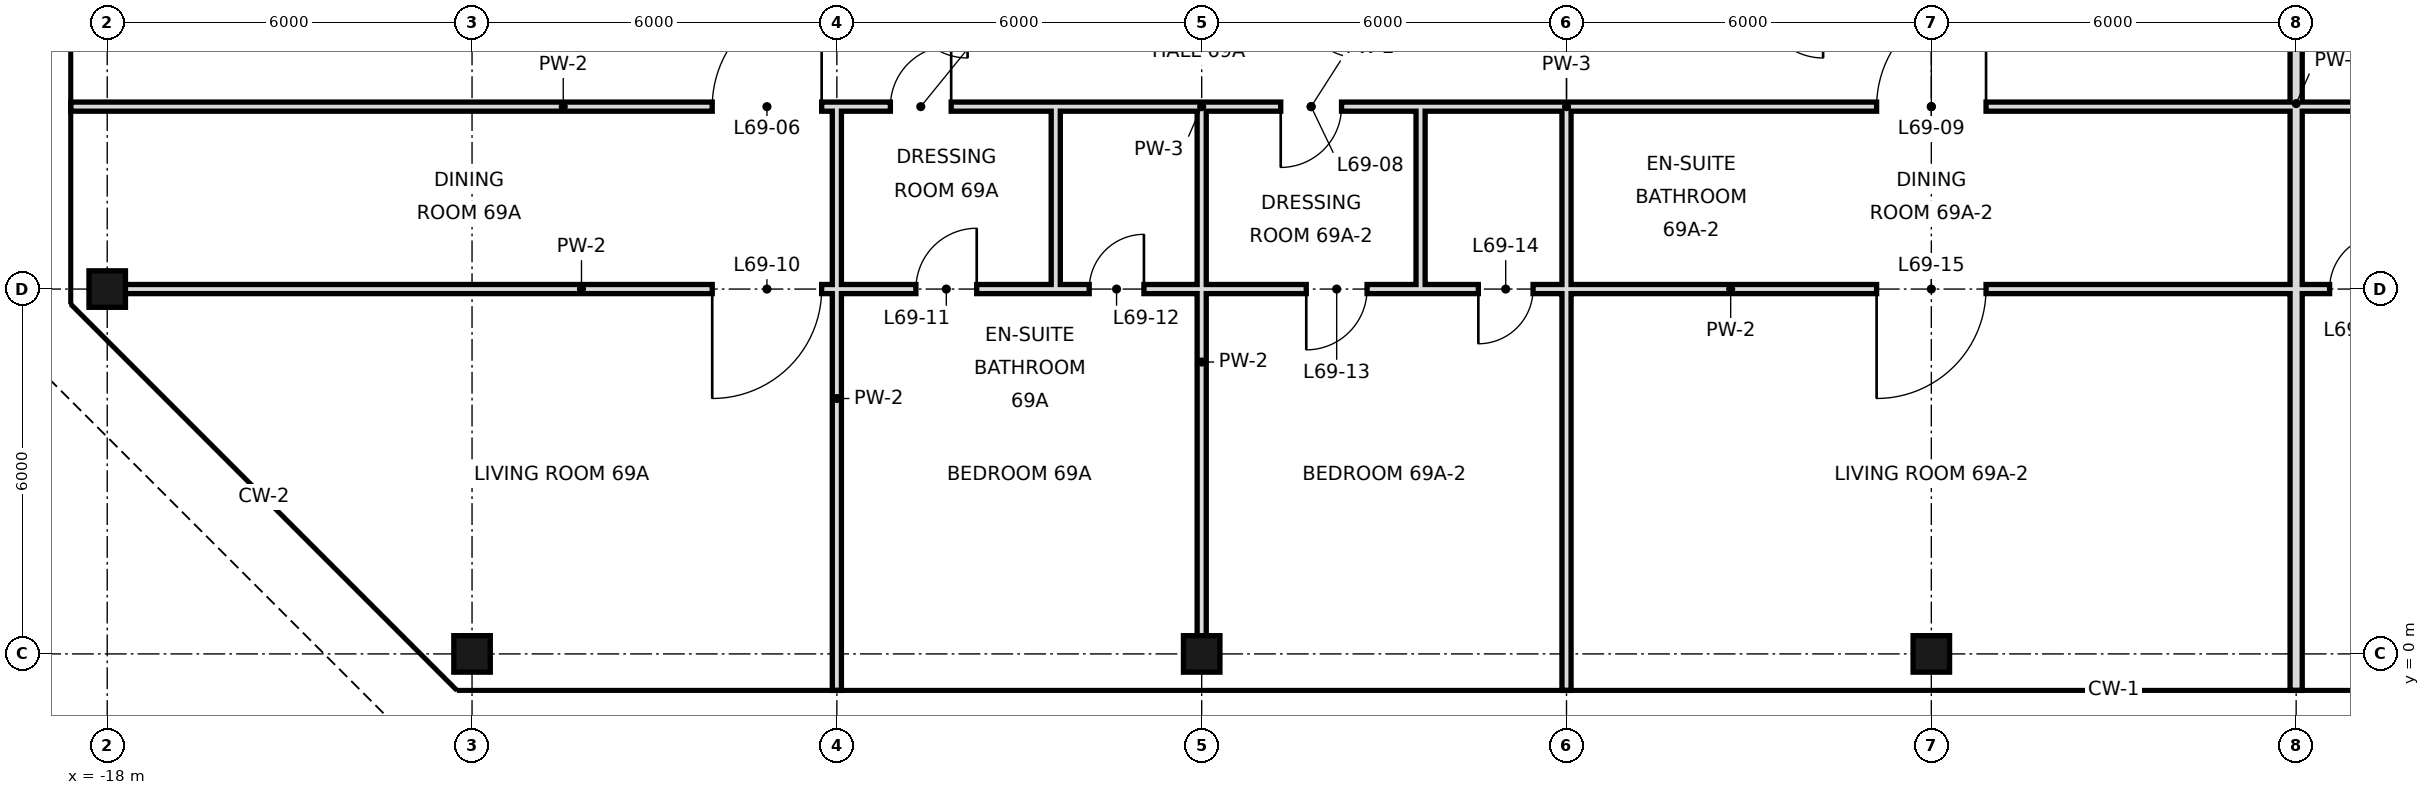
"""IFC4 building model, lengths in metres.
Left out: names, types, materials, properties, quantities, classifications, styles, units other than length and angle.
Written with IfcOpenShell. Run it as: python <this file> out.ifc"""

import sys

from ifc_helpers import new_model, si_unit, direction, frame, frame_2d, origin, origin_2d, place, context, subcontext, project, spatial, rectangle, hollow_rectangle, extrude, element, fill, save


model = new_model("IFC4")
c1 = context("Model", 3, precision=1e-05, world=origin(), true_north=direction((0.0, 1.0)))
c2 = subcontext(c1, "Body", "Model", "MODEL_VIEW")
j1 = project(units=[si_unit("LENGTHUNIT", "METRE"), si_unit("PLANEANGLEUNIT", "RADIAN")], contexts=[c1])
p1 = place(None, origin())
s1 = spatial("IfcSite", under=j1, at=p1, CompositionType="ELEMENT")
p2 = place(p1, origin())
s2 = spatial("IfcBuilding", under=s1, at=p2, CompositionType="ELEMENT")
p3 = place(p2, frame((0.0, 0.0, 294.4)))
s3 = spatial("IfcBuildingStorey", under=s2, at=p3, CompositionType="ELEMENT", Elevation=294.4)
for number, where, z_axis, x_axis in (
    (1, (-18.0, 6.0, 0.0), (0.0, 0.0, 1.0), (1.0, 0.0, 0.0)),
    (2, (-12.0, 0.0, 0.0), (0.0, 0.0, 1.0), (1.0, 0.0, 0.0)),
    (3, (0.0, 0.0, 0.0), (0.0, 0.0, 1.0), (1.0, 0.0, 0.0)),
    (4, (12.0, 0.0, 0.0), (0.0, 0.0, 1.0), (1.0, 0.0, 0.0)),
):
    element("IfcColumn", number, at=place(p3, frame(where, z_axis=z_axis, x_axis=x_axis)), inside=s3, PredefinedType="COLUMN", context=c2, shape_type="SweptSolid", body=[
        extrude(hollow_rectangle(XDim=0.6, YDim=0.6, WallThickness=0.028, at=origin_2d()), origin(), (0.0, 0.0, 1.0), 3.6),
    ])
p4 = place(p3, frame((-2.4, 6.0, 0.0), z_axis=(0.0, 0.0, 1.0), x_axis=(0.0, 1.0, 0.0)))
e5 = element("IfcWall", 5, at=p4, inside=s3, PredefinedType="PARTITIONING", context=c2, shape_type="SweptSolid", body=[
    extrude(rectangle(XDim=3.0, YDim=0.15, at=frame_2d((1.5, 0.0))), origin(), (0.0, 0.0, 1.0), 3.42),
])
p5 = place(p3, frame((-6.0, -0.6, 0.0), z_axis=(0.0, 0.0, 1.0), x_axis=(0.0, 1.0, 0.0)))
e6 = element("IfcWall", 6, at=p5, inside=s3, PredefinedType="PARTITIONING", context=c2, shape_type="SweptSolid", body=[
    extrude(rectangle(XDim=9.6, YDim=0.15, at=frame_2d((4.8, 0.0))), origin(), (0.0, 0.0, 1.0), 3.42),
])
p6 = place(p3, frame((0.0, 0.0, 0.0), z_axis=(0.0, 0.0, 1.0), x_axis=(0.0, 1.0, 0.0)))
e7 = element("IfcWall", 7, at=p6, inside=s3, PredefinedType="PARTITIONING", context=c2, shape_type="SweptSolid", body=[
    extrude(rectangle(XDim=6.0, YDim=0.15, at=frame_2d((3.0, 0.0))), origin(), (0.0, 0.0, 1.0), 2.72),
])
p7 = place(p3, frame((0.0, 6.0, 0.0), z_axis=(0.0, 0.0, 1.0), x_axis=(0.0, 1.0, 0.0)))
e8 = element("IfcWall", 8, at=p7, inside=s3, PredefinedType="PARTITIONING", context=c2, shape_type="SweptSolid", body=[
    extrude(rectangle(XDim=3.0, YDim=0.15, at=frame_2d((1.5, 0.0))), origin(), (0.0, 0.0, 1.0), 2.72),
])
p8 = place(p3, frame((18.0, -0.6, 0.0), z_axis=(0.0, 0.0, 1.0), x_axis=(0.0, 1.0, 0.0)))
e9 = element("IfcWall", 9, at=p8, inside=s3, PredefinedType="SOLIDWALL", context=c2, shape_type="SweptSolid", body=[
    extrude(rectangle(XDim=19.3, YDim=0.2, at=frame_2d((9.65, 0.0))), origin(), (0.0, 0.0, 1.0), 2.72),
])
p9 = place(p3, frame((3.6, 6.0, 0.0), z_axis=(0.0, 0.0, 1.0), x_axis=(0.0, 1.0, 0.0)))
e10 = element("IfcWall", 10, at=p9, inside=s3, PredefinedType="PARTITIONING", context=c2, shape_type="SweptSolid", body=[
    extrude(rectangle(XDim=3.0, YDim=0.15, at=frame_2d((1.5, 0.0))), origin(), (0.0, 0.0, 1.0), 3.42),
])
p10 = place(p3, frame((6.0, -0.6, 0.0), z_axis=(0.0, 0.0, 1.0), x_axis=(0.0, 1.0, 0.0)))
e11 = element("IfcWall", 11, at=p10, inside=s3, PredefinedType="PARTITIONING", context=c2, shape_type="SweptSolid", body=[
    extrude(rectangle(XDim=6.6, YDim=0.15, at=frame_2d((3.3, 0.0))), origin(), (0.0, 0.0, 1.0), 3.42),
])
p11 = place(p3, frame((6.0, 6.0, 0.0), z_axis=(0.0, 0.0, 1.0), x_axis=(0.0, 1.0, 0.0)))
e12 = element("IfcWall", 12, at=p11, inside=s3, PredefinedType="PARTITIONING", context=c2, shape_type="SweptSolid", body=[
    extrude(rectangle(XDim=3.0, YDim=0.15, at=frame_2d((1.5, 0.0))), origin(), (0.0, 0.0, 1.0), 3.42),
])
p12 = place(p3, frame((-18.0, 6.0, 0.0), z_axis=(0.0, 0.0, 1.0), x_axis=(1.0, 0.0, 0.0)))
e13 = element("IfcWall", 13, at=p12, inside=s3, PredefinedType="PARTITIONING", context=c2, shape_type="SweptSolid", body=[
    extrude(rectangle(XDim=15.6, YDim=0.15, at=frame_2d((7.8, 0.0))), origin(), (0.0, 0.0, 1.0), 2.72),
])
p13 = place(p12, frame((9.95, 0.0, 0.0)))
e14 = element("IfcOpeningElement", 14, at=p13, cuts=e13, PredefinedType="OPENING", context=c2, shape_type="SweptSolid", body=[
    extrude(rectangle(XDim=1.8, YDim=2.4, at=frame_2d((0.9, 1.2))), frame((0.0, 0.085, 0.0), z_axis=(0.0, -1.0, 0.0), x_axis=(1.0, 0.0, 0.0)), (0.0, 0.0, 1.0), 0.17),
])
p14 = place(p12, frame((13.3, 0.0, 0.0)))
e15 = element("IfcOpeningElement", 15, at=p14, cuts=e13, PredefinedType="OPENING", context=c2, shape_type="SweptSolid", body=[
    extrude(rectangle(XDim=1.0, YDim=2.4, at=frame_2d((0.5, 1.2))), frame((0.0, 0.085, 0.0), z_axis=(0.0, -1.0, 0.0), x_axis=(1.0, 0.0, 0.0)), (0.0, 0.0, 1.0), 0.17),
])
p15 = place(p3, frame((0.0, 6.0, 0.0), z_axis=(0.0, 0.0, 1.0), x_axis=(1.0, 0.0, 0.0)))
e16 = element("IfcWall", 16, at=p15, inside=s3, PredefinedType="PARTITIONING", context=c2, shape_type="SweptSolid", body=[
    extrude(rectangle(XDim=3.6, YDim=0.15, at=frame_2d((1.8, 0.0))), origin(), (0.0, 0.0, 1.0), 2.72),
])
p16 = place(p15, frame((1.72, 0.0, 0.0)))
e17 = element("IfcOpeningElement", 17, at=p16, cuts=e16, PredefinedType="OPENING", context=c2, shape_type="SweptSolid", body=[
    extrude(rectangle(XDim=1.0, YDim=2.4, at=frame_2d((0.5, 1.2))), frame((0.0, 0.085, 0.0), z_axis=(0.0, -1.0, 0.0), x_axis=(1.0, 0.0, 0.0)), (0.0, 0.0, 1.0), 0.17),
])
p17 = place(p3, frame((6.0, 6.0, 0.0), z_axis=(0.0, 0.0, 1.0), x_axis=(1.0, 0.0, 0.0)))
e18 = element("IfcWall", 18, at=p17, inside=s3, PredefinedType="PARTITIONING", context=c2, shape_type="SweptSolid", body=[
    extrude(rectangle(XDim=12.0, YDim=0.15, at=frame_2d((6.0, 0.0))), origin(), (0.0, 0.0, 1.0), 2.72),
])
p18 = place(p17, frame((5.1, 0.0, 0.0)))
e19 = element("IfcOpeningElement", 19, at=p18, cuts=e18, PredefinedType="OPENING", context=c2, shape_type="SweptSolid", body=[
    extrude(rectangle(XDim=1.8, YDim=2.4, at=frame_2d((0.9, 1.2))), frame((0.0, 0.085, 0.0), z_axis=(0.0, -1.0, 0.0), x_axis=(1.0, 0.0, 0.0)), (0.0, 0.0, 1.0), 0.17),
])
p19 = place(p3, frame((-2.4, 6.0, 0.0), z_axis=(0.0, 0.0, 1.0), x_axis=(1.0, 0.0, 0.0)))
e20 = element("IfcWall", 20, at=p19, inside=s3, PredefinedType="PARTITIONING", context=c2, shape_type="SweptSolid", body=[
    extrude(rectangle(XDim=2.4, YDim=0.15, at=frame_2d((1.2, 0.0))), origin(), (0.0, 0.0, 1.0), 2.72),
])
p20 = place(p19, frame((0.55, 0.0, 0.0)))
e21 = element("IfcOpeningElement", 21, at=p20, cuts=e20, PredefinedType="OPENING", context=c2, shape_type="SweptSolid", body=[
    extrude(rectangle(XDim=0.9, YDim=2.4, at=frame_2d((0.45, 1.2))), frame((0.0, 0.085, 0.0), z_axis=(0.0, -1.0, 0.0), x_axis=(1.0, 0.0, 0.0)), (0.0, 0.0, 1.0), 0.17),
])
p21 = place(p3, frame((3.6, 6.0, 0.0), z_axis=(0.0, 0.0, 1.0), x_axis=(1.0, 0.0, 0.0)))
e22 = element("IfcWall", 22, at=p21, inside=s3, PredefinedType="PARTITIONING", context=c2, shape_type="SweptSolid", body=[
    extrude(rectangle(XDim=2.4, YDim=0.15, at=frame_2d((1.2, 0.0))), origin(), (0.0, 0.0, 1.0), 2.72),
])
p22 = place(p21, frame((0.95, 0.0, 0.0)))
e23 = element("IfcOpeningElement", 23, at=p22, cuts=e22, PredefinedType="OPENING", context=c2, shape_type="SweptSolid", body=[
    extrude(rectangle(XDim=0.9, YDim=2.4, at=frame_2d((0.45, 1.2))), frame((0.0, 0.085, 0.0), z_axis=(0.0, -1.0, 0.0), x_axis=(1.0, 0.0, 0.0)), (0.0, 0.0, 1.0), 0.17),
])
p23 = place(p3, frame((18.0, 6.0, 0.0), z_axis=(0.0, 0.0, 1.0), x_axis=(1.0, 0.0, 0.0)))
e24 = element("IfcWall", 24, at=p23, inside=s3, PredefinedType="PARTITIONING", context=c2, shape_type="SweptSolid", body=[
    extrude(rectangle(XDim=2.4, YDim=0.15, at=frame_2d((1.2, 0.0))), origin(), (0.0, 0.0, 1.0), 2.72),
])
p24 = place(p23, frame((0.55, 0.0, 0.0)))
e25 = element("IfcOpeningElement", 25, at=p24, cuts=e24, PredefinedType="OPENING", context=c2, shape_type="SweptSolid", body=[
    extrude(rectangle(XDim=0.9, YDim=2.4, at=frame_2d((0.45, 1.2))), frame((0.0, 0.085, 0.0), z_axis=(0.0, -1.0, 0.0), x_axis=(1.0, 0.0, 0.0)), (0.0, 0.0, 1.0), 0.17),
])
p25 = place(p3, frame((-18.6, 9.0, 0.0), z_axis=(0.0, 0.0, 1.0), x_axis=(1.0, 0.0, 0.0)))
e26 = element("IfcWall", 26, at=p25, inside=s3, PredefinedType="PARTITIONING", context=c2, shape_type="SweptSolid", body=[
    extrude(rectangle(XDim=16.2, YDim=0.15, at=frame_2d((8.1, 0.0))), origin(), (0.0, 0.0, 1.0), 3.42),
])
p26 = place(p25, frame((10.55, 0.0, 0.0)))
e27 = element("IfcOpeningElement", 27, at=p26, cuts=e26, PredefinedType="OPENING", context=c2, shape_type="SweptSolid", body=[
    extrude(rectangle(XDim=1.8, YDim=2.4, at=frame_2d((0.9, 1.2))), frame((0.0, 0.085, 0.0), z_axis=(0.0, -1.0, 0.0), x_axis=(1.0, 0.0, 0.0)), (0.0, 0.0, 1.0), 0.17),
])
p27 = place(p25, frame((13.48, 0.0, 0.0)))
e28 = element("IfcOpeningElement", 28, at=p27, cuts=e26, PredefinedType="OPENING", context=c2, shape_type="SweptSolid", body=[
    extrude(rectangle(XDim=1.0, YDim=2.4, at=frame_2d((0.5, 1.2))), frame((0.0, 0.085, 0.0), z_axis=(0.0, -1.0, 0.0), x_axis=(1.0, 0.0, 0.0)), (0.0, 0.0, 1.0), 0.17),
])
p28 = place(p3, frame((0.0, 9.0, 0.0), z_axis=(0.0, 0.0, 1.0), x_axis=(1.0, 0.0, 0.0)))
e29 = element("IfcWall", 29, at=p28, inside=s3, PredefinedType="PARTITIONING", context=c2, shape_type="SweptSolid", body=[
    extrude(rectangle(XDim=3.6, YDim=0.15, at=frame_2d((1.8, 0.0))), origin(), (0.0, 0.0, 1.0), 3.42),
])
p29 = place(p28, frame((1.3, 0.0, 0.0)))
e30 = element("IfcOpeningElement", 30, at=p29, cuts=e29, PredefinedType="OPENING", context=c2, shape_type="SweptSolid", body=[
    extrude(rectangle(XDim=1.0, YDim=2.4, at=frame_2d((0.5, 1.2))), frame((0.0, 0.085, 0.0), z_axis=(0.0, -1.0, 0.0), x_axis=(1.0, 0.0, 0.0)), (0.0, 0.0, 1.0), 0.17),
])
p30 = place(p3, frame((6.0, 9.0, 0.0), z_axis=(0.0, 0.0, 1.0), x_axis=(1.0, 0.0, 0.0)))
e31 = element("IfcWall", 31, at=p30, inside=s3, PredefinedType="PARTITIONING", context=c2, shape_type="SweptSolid", body=[
    extrude(rectangle(XDim=12.0, YDim=0.15, at=frame_2d((6.0, 0.0))), origin(), (0.0, 0.0, 1.0), 3.42),
])
p31 = place(p30, frame((5.1, 0.0, 0.0)))
e32 = element("IfcOpeningElement", 32, at=p31, cuts=e31, PredefinedType="OPENING", context=c2, shape_type="SweptSolid", body=[
    extrude(rectangle(XDim=1.8, YDim=2.4, at=frame_2d((0.9, 1.2))), frame((0.0, 0.085, 0.0), z_axis=(0.0, -1.0, 0.0), x_axis=(1.0, 0.0, 0.0)), (0.0, 0.0, 1.0), 0.17),
])
for number, where, z_axis, x_axis in (
    (33, (-2.4, 9.0, 0.0), (0.0, 0.0, 1.0), (1.0, 0.0, 0.0)),
    (34, (3.6, 9.0, 0.0), (0.0, 0.0, 1.0), (1.0, 0.0, 0.0)),
    (35, (18.0, 9.0, 0.0), (0.0, 0.0, 1.0), (1.0, 0.0, 0.0)),
):
    element("IfcWall", number, at=place(p3, frame(where, z_axis=z_axis, x_axis=x_axis)), inside=s3, PredefinedType="PARTITIONING", context=c2, shape_type="SweptSolid", body=[
        extrude(rectangle(XDim=2.4, YDim=0.15, at=frame_2d((1.2, 0.0))), origin(), (0.0, 0.0, 1.0), 3.42),
    ])
p32 = place(p26, frame((1.8, 0.0, 0.0), z_axis=(0.0, 0.0, 1.0), x_axis=(-1.0, 0.0, 0.0)))
e36 = element("IfcDoor", 36, at=p32, inside=s3, OperationType="SINGLE_SWING_LEFT", PredefinedType="DOOR", context=c2, shape_type="SweptSolid", body=[
    extrude(rectangle(XDim=1.8, YDim=2.4, at=frame_2d((0.9, 1.2))), frame((0.0, 0.025, 0.0), z_axis=(0.0, -1.0, 0.0), x_axis=(1.0, 0.0, 0.0)), (0.0, 0.0, 1.0), 0.05),
])
fill(e27, e36)
p33 = place(p27, frame((1.0, 0.0, 0.0), z_axis=(0.0, 0.0, 1.0), x_axis=(-1.0, 0.0, 0.0)))
e37 = element("IfcDoor", 37, at=p33, inside=s3, OperationType="SINGLE_SWING_LEFT", PredefinedType="DOOR", context=c2, shape_type="SweptSolid", body=[
    extrude(rectangle(XDim=1.0, YDim=2.4, at=frame_2d((0.5, 1.2))), frame((0.0, 0.025, 0.0), z_axis=(0.0, -1.0, 0.0), x_axis=(1.0, 0.0, 0.0)), (0.0, 0.0, 1.0), 0.05),
])
fill(e28, e37)
p34 = place(p29, frame((1.0, 0.0, 0.0), z_axis=(0.0, 0.0, 1.0), x_axis=(-1.0, 0.0, 0.0)))
e38 = element("IfcDoor", 38, at=p34, inside=s3, OperationType="SINGLE_SWING_RIGHT", PredefinedType="DOOR", context=c2, shape_type="SweptSolid", body=[
    extrude(rectangle(XDim=1.0, YDim=2.4, at=frame_2d((0.5, 1.2))), frame((0.0, 0.025, 0.0), z_axis=(0.0, -1.0, 0.0), x_axis=(1.0, 0.0, 0.0)), (0.0, 0.0, 1.0), 0.05),
])
fill(e30, e38)
p35 = place(p31, frame((1.8, 0.0, 0.0), z_axis=(0.0, 0.0, 1.0), x_axis=(-1.0, 0.0, 0.0)))
e39 = element("IfcDoor", 39, at=p35, inside=s3, OperationType="SINGLE_SWING_LEFT", PredefinedType="DOOR", context=c2, shape_type="SweptSolid", body=[
    extrude(rectangle(XDim=1.8, YDim=2.4, at=frame_2d((0.9, 1.2))), frame((0.0, 0.025, 0.0), z_axis=(0.0, -1.0, 0.0), x_axis=(1.0, 0.0, 0.0)), (0.0, 0.0, 1.0), 0.05),
])
fill(e32, e39)
p36 = place(p13, frame((1.8, 0.0, 0.0), z_axis=(0.0, 0.0, 1.0), x_axis=(-1.0, 0.0, 0.0)))
e40 = element("IfcDoor", 40, at=p36, inside=s3, OperationType="SINGLE_SWING_RIGHT", PredefinedType="DOOR", context=c2, shape_type="SweptSolid", body=[
    extrude(rectangle(XDim=1.8, YDim=2.4, at=frame_2d((0.9, 1.2))), frame((0.0, 0.025, 0.0), z_axis=(0.0, -1.0, 0.0), x_axis=(1.0, 0.0, 0.0)), (0.0, 0.0, 1.0), 0.05),
])
fill(e14, e40)
p37 = place(p14, frame((1.0, 0.0, 0.0), z_axis=(0.0, 0.0, 1.0), x_axis=(-1.0, 0.0, 0.0)))
e41 = element("IfcDoor", 41, at=p37, inside=s3, OperationType="SINGLE_SWING_LEFT", PredefinedType="DOOR", context=c2, shape_type="SweptSolid", body=[
    extrude(rectangle(XDim=1.0, YDim=2.4, at=frame_2d((0.5, 1.2))), frame((0.0, 0.025, 0.0), z_axis=(0.0, -1.0, 0.0), x_axis=(1.0, 0.0, 0.0)), (0.0, 0.0, 1.0), 0.05),
])
fill(e15, e41)
p38 = place(p20, frame((0.9, 0.0, 0.0), z_axis=(0.0, 0.0, 1.0), x_axis=(-1.0, 0.0, 0.0)))
e42 = element("IfcDoor", 42, at=p38, inside=s3, OperationType="SINGLE_SWING_LEFT", PredefinedType="DOOR", context=c2, shape_type="SweptSolid", body=[
    extrude(rectangle(XDim=0.9, YDim=2.4, at=frame_2d((0.45, 1.2))), frame((0.0, 0.025, 0.0), z_axis=(0.0, -1.0, 0.0), x_axis=(1.0, 0.0, 0.0)), (0.0, 0.0, 1.0), 0.05),
])
fill(e21, e42)
p39 = place(p16, frame((1.0, 0.0, 0.0), z_axis=(0.0, 0.0, 1.0), x_axis=(-1.0, 0.0, 0.0)))
e43 = element("IfcDoor", 43, at=p39, inside=s3, OperationType="SINGLE_SWING_RIGHT", PredefinedType="DOOR", context=c2, shape_type="SweptSolid", body=[
    extrude(rectangle(XDim=1.0, YDim=2.4, at=frame_2d((0.5, 1.2))), frame((0.0, 0.025, 0.0), z_axis=(0.0, -1.0, 0.0), x_axis=(1.0, 0.0, 0.0)), (0.0, 0.0, 1.0), 0.05),
])
fill(e17, e43)
p40 = place(p22, frame((0.9, 0.0, 0.0), z_axis=(0.0, 0.0, 1.0), x_axis=(-1.0, 0.0, 0.0)))
e44 = element("IfcDoor", 44, at=p40, inside=s3, OperationType="SINGLE_SWING_RIGHT", PredefinedType="DOOR", context=c2, shape_type="SweptSolid", body=[
    extrude(rectangle(XDim=0.9, YDim=2.4, at=frame_2d((0.45, 1.2))), frame((0.0, 0.025, 0.0), z_axis=(0.0, -1.0, 0.0), x_axis=(1.0, 0.0, 0.0)), (0.0, 0.0, 1.0), 0.05),
])
fill(e23, e44)
p41 = place(p18, frame((1.8, 0.0, 0.0), z_axis=(0.0, 0.0, 1.0), x_axis=(-1.0, 0.0, 0.0)))
e45 = element("IfcDoor", 45, at=p41, inside=s3, OperationType="SINGLE_SWING_RIGHT", PredefinedType="DOOR", context=c2, shape_type="SweptSolid", body=[
    extrude(rectangle(XDim=1.8, YDim=2.4, at=frame_2d((0.9, 1.2))), frame((0.0, 0.025, 0.0), z_axis=(0.0, -1.0, 0.0), x_axis=(1.0, 0.0, 0.0)), (0.0, 0.0, 1.0), 0.05),
])
fill(e19, e45)
p42 = place(p24, frame((0.9, 0.0, 0.0), z_axis=(0.0, 0.0, 1.0), x_axis=(-1.0, 0.0, 0.0)))
e46 = element("IfcDoor", 46, at=p42, inside=s3, OperationType="SINGLE_SWING_LEFT", PredefinedType="DOOR", context=c2, shape_type="SweptSolid", body=[
    extrude(rectangle(XDim=0.9, YDim=2.4, at=frame_2d((0.45, 1.2))), frame((0.0, 0.025, 0.0), z_axis=(0.0, -1.0, 0.0), x_axis=(1.0, 0.0, 0.0)), (0.0, 0.0, 1.0), 0.05),
])
fill(e25, e46)
save(model, sys.argv[1])
